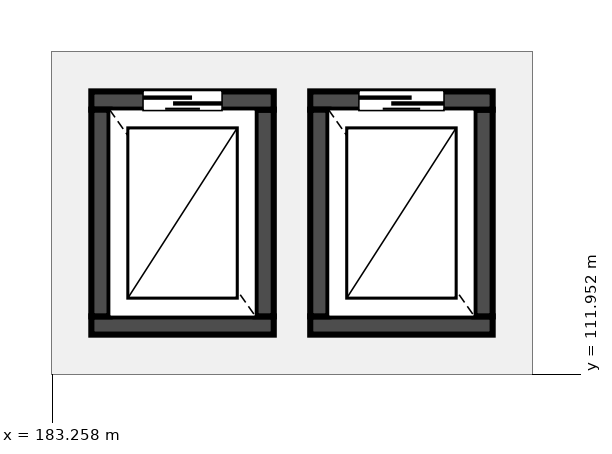
"""IFC4 building model, lengths in metres.
Left out: names, types, materials, properties, quantities, classifications, styles, units other than length and angle.
Written with IfcOpenShell. Run it as: python <this file> out.ifc"""

import sys

from ifc_helpers import new_model, si_unit, direction, frame, frame_2d, origin, place, context, subcontext, project, spatial, rectangle, extrude, element, fill, save


model = new_model("IFC4")
c1 = context("Model", 3, precision=1e-05, world=origin(), true_north=direction((0.0, 1.0)))
c2 = subcontext(c1, "Body", "Model", "MODEL_VIEW")
j1 = project(units=[si_unit("LENGTHUNIT", "METRE"), si_unit("PLANEANGLEUNIT", "RADIAN")], contexts=[c1])
p1 = place(None, origin())
s1 = spatial("IfcSite", under=j1, at=p1, CompositionType="ELEMENT")
p2 = place(p1, origin())
s2 = spatial("IfcBuilding", under=s1, at=p2, CompositionType="ELEMENT")
p3 = place(p2, frame((0.0, 0.0, 9.9)))
s3 = spatial("IfcBuildingStorey", under=s2, at=p3, CompositionType="ELEMENT", Elevation=9.9)
p4 = place(p3, frame((183.9, 112.75, 0.0), z_axis=(0.0, 0.0, 1.0), x_axis=(1.0, 0.0, 0.0)))
e1 = element("IfcWall", 1, at=p4, inside=s3, PredefinedType="SHEAR", context=c2, shape_type="SweptSolid", body=[
    extrude(rectangle(XDim=3.0, YDim=0.3, at=frame_2d((1.5, 0.0))), origin(), (0.0, 0.0, 1.0), 3.6),
])
p5 = place(p3, frame((186.75, 112.9, 0.0), z_axis=(0.0, 0.0, 1.0), x_axis=(0.0, 1.0, 0.0)))
e2 = element("IfcWall", 2, at=p5, inside=s3, PredefinedType="SHEAR", context=c2, shape_type="SweptSolid", body=[
    extrude(rectangle(XDim=3.4, YDim=0.3, at=frame_2d((1.7, 0.0))), origin(), (0.0, 0.0, 1.0), 3.6),
])
p6 = place(p3, frame((186.9, 116.45, 0.0), z_axis=(0.0, 0.0, 1.0), x_axis=(-1.0, 0.0, 0.0)))
e3 = element("IfcWall", 3, at=p6, inside=s3, PredefinedType="SHEAR", context=c2, shape_type="SweptSolid", body=[
    extrude(rectangle(XDim=3.0, YDim=0.3, at=frame_2d((1.5, 0.0))), origin(), (0.0, 0.0, 1.0), 3.6),
])
p7 = place(p6, frame((0.85, 0.0, 0.0)))
e4 = element("IfcOpeningElement", 4, at=p7, cuts=e3, PredefinedType="OPENING", context=c2, shape_type="SweptSolid", body=[
    extrude(rectangle(XDim=1.3, YDim=2.3, at=frame_2d((0.65, 1.15))), frame((0.0, 0.16, 0.0), z_axis=(0.0, -1.0, 0.0), x_axis=(1.0, 0.0, 0.0)), (0.0, 0.0, 1.0), 0.32),
])
p8 = place(p3, frame((184.05, 116.3, 0.0), z_axis=(0.0, 0.0, 1.0), x_axis=(0.0, -1.0, 0.0)))
e5 = element("IfcWall", 5, at=p8, inside=s3, PredefinedType="SHEAR", context=c2, shape_type="SweptSolid", body=[
    extrude(rectangle(XDim=3.4, YDim=0.3, at=frame_2d((1.7, 0.0))), origin(), (0.0, 0.0, 1.0), 3.6),
])
p9 = place(p3, frame((187.5, 112.75, 0.0), z_axis=(0.0, 0.0, 1.0), x_axis=(1.0, 0.0, 0.0)))
e6 = element("IfcWall", 6, at=p9, inside=s3, PredefinedType="SHEAR", context=c2, shape_type="SweptSolid", body=[
    extrude(rectangle(XDim=3.0, YDim=0.3, at=frame_2d((1.5, 0.0))), origin(), (0.0, 0.0, 1.0), 3.6),
])
p10 = place(p3, frame((190.35, 112.9, 0.0), z_axis=(0.0, 0.0, 1.0), x_axis=(0.0, 1.0, 0.0)))
e7 = element("IfcWall", 7, at=p10, inside=s3, PredefinedType="SHEAR", context=c2, shape_type="SweptSolid", body=[
    extrude(rectangle(XDim=3.4, YDim=0.3, at=frame_2d((1.7, 0.0))), origin(), (0.0, 0.0, 1.0), 3.6),
])
p11 = place(p3, frame((190.5, 116.45, 0.0), z_axis=(0.0, 0.0, 1.0), x_axis=(-1.0, 0.0, 0.0)))
e8 = element("IfcWall", 8, at=p11, inside=s3, PredefinedType="SHEAR", context=c2, shape_type="SweptSolid", body=[
    extrude(rectangle(XDim=3.0, YDim=0.3, at=frame_2d((1.5, 0.0))), origin(), (0.0, 0.0, 1.0), 3.6),
])
p12 = place(p11, frame((0.8, 0.0, 0.0)))
e9 = element("IfcOpeningElement", 9, at=p12, cuts=e8, PredefinedType="OPENING", context=c2, shape_type="SweptSolid", body=[
    extrude(rectangle(XDim=1.4, YDim=2.3, at=frame_2d((0.7, 1.15))), frame((0.0, 0.16, 0.0), z_axis=(0.0, -1.0, 0.0), x_axis=(1.0, 0.0, 0.0)), (0.0, 0.0, 1.0), 0.32),
])
p13 = place(p3, frame((187.65, 116.3, 0.0), z_axis=(0.0, 0.0, 1.0), x_axis=(0.0, -1.0, 0.0)))
e10 = element("IfcWall", 10, at=p13, inside=s3, PredefinedType="SHEAR", context=c2, shape_type="SweptSolid", body=[
    extrude(rectangle(XDim=3.4, YDim=0.3, at=frame_2d((1.7, 0.0))), origin(), (0.0, 0.0, 1.0), 3.6),
])
p14 = place(p7, origin())
e11 = element("IfcDoor", 11, at=p14, inside=s3, OperationType="SLIDING_TO_LEFT", PredefinedType="DOOR", context=c2, shape_type="SweptSolid", body=[
    extrude(rectangle(XDim=1.3, YDim=2.3, at=frame_2d((0.65, 1.15))), frame((0.0, 0.025, 0.0), z_axis=(0.0, -1.0, 0.0), x_axis=(1.0, 0.0, 0.0)), (0.0, 0.0, 1.0), 0.05),
])
fill(e4, e11)
p15 = place(p12, origin())
e12 = element("IfcDoor", 12, at=p15, inside=s3, OperationType="SLIDING_TO_LEFT", PredefinedType="DOOR", context=c2, shape_type="SweptSolid", body=[
    extrude(rectangle(XDim=1.4, YDim=2.3, at=frame_2d((0.7, 1.15))), frame((0.0, 0.025, 0.0), z_axis=(0.0, -1.0, 0.0), x_axis=(1.0, 0.0, 0.0)), (0.0, 0.0, 1.0), 0.05),
])
fill(e9, e12)
save(model, sys.argv[1])
